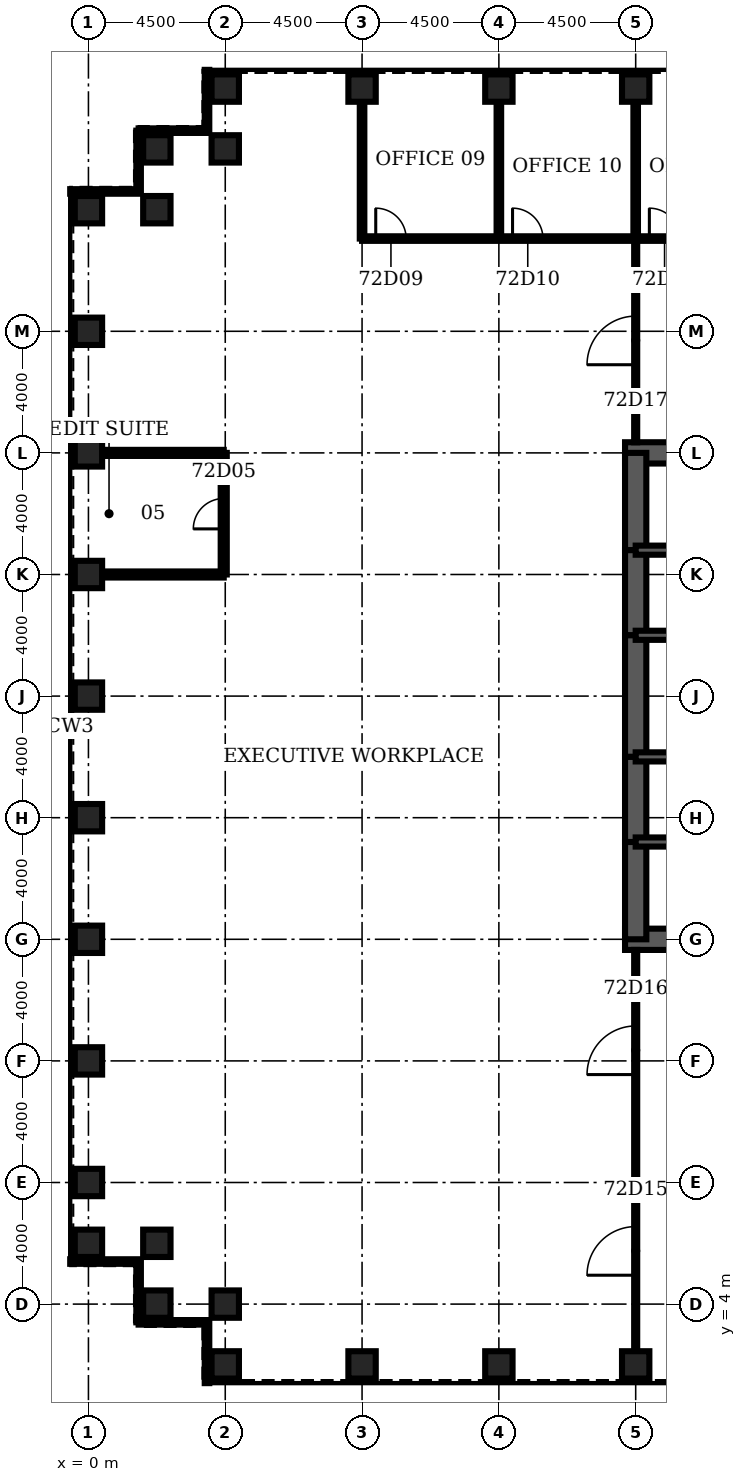
"""IFC4 building model, lengths in metres.
Left out: names, types, materials, properties, quantities, classifications, styles, units other than length and angle.
Written with IfcOpenShell. Run it as: python <this file> out.ifc"""

import sys

from ifc_helpers import new_model, si_unit, direction, frame, frame_2d, origin, origin_2d, place, context, subcontext, project, spatial, rectangle, hollow_rectangle, extrude, element, fill, save


model = new_model("IFC4")
c1 = context("Model", 3, precision=1e-05, world=origin(), true_north=direction((0.0, 1.0)))
c2 = subcontext(c1, "Body", "Model", "MODEL_VIEW")
j1 = project(units=[si_unit("LENGTHUNIT", "METRE"), si_unit("PLANEANGLEUNIT", "RADIAN")], contexts=[c1])
p1 = place(None, origin())
s1 = spatial("IfcSite", under=j1, at=p1, CompositionType="ELEMENT")
p2 = place(p1, origin())
s2 = spatial("IfcBuilding", under=s1, at=p2, CompositionType="ELEMENT")
p3 = place(p2, frame((0.0, 0.0, 317.3)))
s3 = spatial("IfcBuildingStorey", under=s2, at=p3, CompositionType="ELEMENT", Elevation=317.3)
for number, where, z_axis, x_axis in (
    (1, (4.5, 2.0, 0.0), (0.0, 0.0, 1.0), (0.0, 1.0, 0.0)),
    (2, (9.0, 2.0, 0.0), (0.0, 0.0, 1.0), (0.0, 1.0, 0.0)),
    (3, (13.5, 2.0, 0.0), (0.0, 0.0, 1.0), (0.0, 1.0, 0.0)),
    (4, (18.0, 2.0, 0.0), (0.0, 0.0, 1.0), (0.0, 1.0, 0.0)),
    (5, (18.0, 44.0, 0.0), (0.0, 0.0, 1.0), (0.0, 1.0, 0.0)),
    (6, (13.5, 44.0, 0.0), (0.0, 0.0, 1.0), (0.0, 1.0, 0.0)),
    (7, (9.0, 44.0, 0.0), (0.0, 0.0, 1.0), (0.0, 1.0, 0.0)),
    (8, (4.5, 44.0, 0.0), (0.0, 0.0, 1.0), (0.0, 1.0, 0.0)),
    (9, (4.5, 42.0, 0.0), (0.0, 0.0, 1.0), (0.0, 1.0, 0.0)),
    (10, (2.25, 42.0, 0.0), (0.0, 0.0, 1.0), (1.0, 0.0, 0.0)),
    (11, (2.25, 40.0, 0.0), (0.0, 0.0, 1.0), (1.0, 0.0, 0.0)),
    (12, (0.0, 40.0, 0.0), (0.0, 0.0, 1.0), (1.0, 0.0, 0.0)),
    (13, (0.0, 36.0, 0.0), (0.0, 0.0, 1.0), (1.0, 0.0, 0.0)),
    (14, (0.0, 32.0, 0.0), (0.0, 0.0, 1.0), (1.0, 0.0, 0.0)),
    (15, (0.0, 28.0, 0.0), (0.0, 0.0, 1.0), (1.0, 0.0, 0.0)),
    (16, (0.0, 24.0, 0.0), (0.0, 0.0, 1.0), (1.0, 0.0, 0.0)),
    (17, (0.0, 20.0, 0.0), (0.0, 0.0, 1.0), (1.0, 0.0, 0.0)),
    (18, (0.0, 16.0, 0.0), (0.0, 0.0, 1.0), (1.0, 0.0, 0.0)),
    (19, (0.0, 12.0, 0.0), (0.0, 0.0, 1.0), (1.0, 0.0, 0.0)),
    (20, (0.0, 8.0, 0.0), (0.0, 0.0, 1.0), (1.0, 0.0, 0.0)),
    (21, (0.0, 6.0, 0.0), (0.0, 0.0, 1.0), (1.0, 0.0, 0.0)),
    (22, (2.25, 6.0, 0.0), (0.0, 0.0, 1.0), (1.0, 0.0, 0.0)),
    (23, (2.25, 4.0, 0.0), (0.0, 0.0, 1.0), (1.0, 0.0, 0.0)),
    (24, (4.5, 4.0, 0.0), (0.0, 0.0, 1.0), (0.0, 1.0, 0.0)),
):
    element("IfcColumn", number, at=place(p3, frame(where, z_axis=z_axis, x_axis=x_axis)), inside=s3, PredefinedType="COLUMN", context=c2, shape_type="SweptSolid", body=[
        extrude(hollow_rectangle(XDim=0.9, YDim=0.9, WallThickness=0.05, at=origin_2d()), origin(), (0.0, 0.0, 1.0), 4.2),
    ])
for number, where, z_axis, x_axis in (
    (25, (17.65, 16.0, 0.0), (0.0, 0.0, 1.0), (1.0, 0.0, 0.0)),
    (26, (27.0, 32.0, 0.0), (0.0, 0.0, 1.0), (-1.0, 0.0, 0.0)),
):
    element("IfcWall", number, at=place(p3, frame(where, z_axis=z_axis, x_axis=x_axis)), inside=s3, PredefinedType="SHEAR", context=c2, shape_type="SweptSolid", body=[
        extrude(rectangle(XDim=9.35, YDim=0.7, at=frame_2d((4.675, 0.0))), origin(), (0.0, 0.0, 1.0), 4.2),
    ])
p4 = place(p3, frame((18.0, 32.0, 0.0), z_axis=(0.0, 0.0, 1.0), x_axis=(0.0, -1.0, 0.0)))
e27 = element("IfcWall", 27, at=p4, inside=s3, PredefinedType="SHEAR", context=c2, shape_type="SweptSolid", body=[
    extrude(rectangle(XDim=3.2, YDim=0.7, at=frame_2d((1.6, 0.0))), origin(), (0.0, 0.0, 1.0), 4.2),
])
p5 = place(p3, frame((18.0, 28.8, 0.0), z_axis=(0.0, 0.0, 1.0), x_axis=(0.0, -1.0, 0.0)))
e28 = element("IfcWall", 28, at=p5, inside=s3, PredefinedType="SHEAR", context=c2, shape_type="SweptSolid", body=[
    extrude(rectangle(XDim=2.8, YDim=0.7, at=frame_2d((1.4, 0.0))), origin(), (0.0, 0.0, 1.0), 4.2),
])
p6 = place(p5, frame((0.4, 0.0, 0.0)))
e29 = element("IfcOpeningElement", 29, at=p6, cuts=e28, PredefinedType="OPENING", context=c2, shape_type="SweptSolid", body=[
    extrude(rectangle(XDim=1.8, YDim=2.1, at=frame_2d((0.9, 1.05))), frame((0.0, 0.36, 0.0), z_axis=(0.0, -1.0, 0.0), x_axis=(1.0, 0.0, 0.0)), (0.0, 0.0, 1.0), 0.72),
])
p7 = place(p3, frame((18.0, 26.0, 0.0), z_axis=(0.0, 0.0, 1.0), x_axis=(0.0, -1.0, 0.0)))
e30 = element("IfcWall", 30, at=p7, inside=s3, PredefinedType="SHEAR", context=c2, shape_type="SweptSolid", body=[
    extrude(rectangle(XDim=4.0, YDim=0.7, at=frame_2d((2.0, 0.0))), origin(), (0.0, 0.0, 1.0), 4.2),
])
p8 = place(p3, frame((18.0, 22.0, 0.0), z_axis=(0.0, 0.0, 1.0), x_axis=(0.0, -1.0, 0.0)))
e31 = element("IfcWall", 31, at=p8, inside=s3, PredefinedType="SHEAR", context=c2, shape_type="SweptSolid", body=[
    extrude(rectangle(XDim=2.8, YDim=0.7, at=frame_2d((1.4, 0.0))), origin(), (0.0, 0.0, 1.0), 4.2),
])
p9 = place(p8, frame((0.6, 0.0, 0.0)))
e32 = element("IfcOpeningElement", 32, at=p9, cuts=e31, PredefinedType="OPENING", context=c2, shape_type="SweptSolid", body=[
    extrude(rectangle(XDim=1.8, YDim=2.1, at=frame_2d((0.9, 1.05))), frame((0.0, 0.36, 0.0), z_axis=(0.0, -1.0, 0.0), x_axis=(1.0, 0.0, 0.0)), (0.0, 0.0, 1.0), 0.72),
])
p10 = place(p3, frame((18.0, 19.2, 0.0), z_axis=(0.0, 0.0, 1.0), x_axis=(0.0, -1.0, 0.0)))
e33 = element("IfcWall", 33, at=p10, inside=s3, PredefinedType="SHEAR", context=c2, shape_type="SweptSolid", body=[
    extrude(rectangle(XDim=3.2, YDim=0.7, at=frame_2d((1.6, 0.0))), origin(), (0.0, 0.0, 1.0), 4.2),
])
p11 = place(p3, frame((18.0, 19.2, 0.0), z_axis=(0.0, 0.0, 1.0), x_axis=(1.0, 0.0, 0.0)))
e34 = element("IfcWall", 34, at=p11, inside=s3, PredefinedType="SOLIDWALL", context=c2, shape_type="SweptSolid", body=[
    extrude(rectangle(XDim=9.0, YDim=0.3, at=frame_2d((4.5, 0.0))), origin(), (0.0, 0.0, 1.0), 4.2),
])
p12 = place(p11, frame((0.65, 0.0, 0.0)))
e35 = element("IfcOpeningElement", 35, at=p12, cuts=e34, PredefinedType="OPENING", context=c2, shape_type="SweptSolid", body=[
    extrude(rectangle(XDim=1.0, YDim=2.1, at=frame_2d((0.5, 1.05))), frame((0.0, 0.16, 0.0), z_axis=(0.0, -1.0, 0.0), x_axis=(1.0, 0.0, 0.0)), (0.0, 0.0, 1.0), 0.32),
])
p13 = place(p3, frame((18.0, 28.8, 0.0), z_axis=(0.0, 0.0, 1.0), x_axis=(1.0, 0.0, 0.0)))
e36 = element("IfcWall", 36, at=p13, inside=s3, PredefinedType="SOLIDWALL", context=c2, shape_type="SweptSolid", body=[
    extrude(rectangle(XDim=9.0, YDim=0.3, at=frame_2d((4.5, 0.0))), origin(), (0.0, 0.0, 1.0), 4.2),
])
p14 = place(p13, frame((0.65, 0.0, 0.0)))
e37 = element("IfcOpeningElement", 37, at=p14, cuts=e36, PredefinedType="OPENING", context=c2, shape_type="SweptSolid", body=[
    extrude(rectangle(XDim=1.0, YDim=2.1, at=frame_2d((0.5, 1.05))), frame((0.0, 0.16, 0.0), z_axis=(0.0, -1.0, 0.0), x_axis=(1.0, 0.0, 0.0)), (0.0, 0.0, 1.0), 0.32),
])
p15 = place(p3, frame((18.0, 22.0, 0.0), z_axis=(0.0, 0.0, 1.0), x_axis=(1.0, 0.0, 0.0)))
e38 = element("IfcWall", 38, at=p15, inside=s3, PredefinedType="SOLIDWALL", context=c2, shape_type="SweptSolid", body=[
    extrude(rectangle(XDim=6.0, YDim=0.3, at=frame_2d((3.0, 0.0))), origin(), (0.0, 0.0, 1.0), 4.2),
])
p16 = place(p15, frame((4.4, 0.0, 0.0)))
e39 = element("IfcOpeningElement", 39, at=p16, cuts=e38, PredefinedType="OPENING", context=c2, shape_type="SweptSolid", body=[
    extrude(rectangle(XDim=1.0, YDim=2.1, at=frame_2d((0.5, 1.05))), frame((0.0, 0.16, 0.0), z_axis=(0.0, -1.0, 0.0), x_axis=(1.0, 0.0, 0.0)), (0.0, 0.0, 1.0), 0.32),
])
p17 = place(p15, frame((0.9, 0.0, 0.0)))
e40 = element("IfcOpeningElement", 40, at=p17, cuts=e38, PredefinedType="OPENING", context=c2, shape_type="SweptSolid", body=[
    extrude(rectangle(XDim=1.0, YDim=2.1, at=frame_2d((0.5, 1.05))), frame((0.0, 0.16, 0.0), z_axis=(0.0, -1.0, 0.0), x_axis=(1.0, 0.0, 0.0)), (0.0, 0.0, 1.0), 0.32),
])
p18 = place(p3, frame((18.0, 26.0, 0.0), z_axis=(0.0, 0.0, 1.0), x_axis=(1.0, 0.0, 0.0)))
e41 = element("IfcWall", 41, at=p18, inside=s3, PredefinedType="SOLIDWALL", context=c2, shape_type="SweptSolid", body=[
    extrude(rectangle(XDim=6.0, YDim=0.3, at=frame_2d((3.0, 0.0))), origin(), (0.0, 0.0, 1.0), 4.2),
])
for number, where, z_axis, x_axis in (
    (42, (0.45, 28.0, 0.0), (0.0, 0.0, 1.0), (1.0, 0.0, 0.0)),
    (43, (0.45, 32.0, 0.0), (0.0, 0.0, 1.0), (1.0, 0.0, 0.0)),
):
    element("IfcWall", number, at=place(p3, frame(where, z_axis=z_axis, x_axis=x_axis)), inside=s3, PredefinedType="PARTITIONING", context=c2, shape_type="SweptSolid", body=[
        extrude(rectangle(XDim=4.0, YDim=0.2, at=frame_2d((2.0, 0.0))), origin(), (0.0, 0.0, 1.0), 3.0),
    ])
p19 = place(p3, frame((9.0, 39.05, 0.0), z_axis=(0.0, 0.0, 1.0), x_axis=(1.0, 0.0, 0.0)))
e44 = element("IfcWall", 44, at=p19, inside=s3, PredefinedType="PARTITIONING", context=c2, shape_type="SweptSolid", body=[
    extrude(rectangle(XDim=27.0, YDim=0.15, at=frame_2d((13.5, 0.0))), origin(), (0.0, 0.0, 1.0), 3.0),
])
p20 = place(p19, frame((0.45, 0.0, 0.0)))
e45 = element("IfcOpeningElement", 45, at=p20, cuts=e44, PredefinedType="OPENING", context=c2, shape_type="SweptSolid", body=[
    extrude(rectangle(XDim=1.0, YDim=2.1, at=frame_2d((0.5, 1.05))), frame((0.0, 0.085, 0.0), z_axis=(0.0, -1.0, 0.0), x_axis=(1.0, 0.0, 0.0)), (0.0, 0.0, 1.0), 0.17),
])
p21 = place(p19, frame((4.95, 0.0, 0.0)))
e46 = element("IfcOpeningElement", 46, at=p21, cuts=e44, PredefinedType="OPENING", context=c2, shape_type="SweptSolid", body=[
    extrude(rectangle(XDim=1.0, YDim=2.1, at=frame_2d((0.5, 1.05))), frame((0.0, 0.085, 0.0), z_axis=(0.0, -1.0, 0.0), x_axis=(1.0, 0.0, 0.0)), (0.0, 0.0, 1.0), 0.17),
])
p22 = place(p19, frame((9.45, 0.0, 0.0)))
e47 = element("IfcOpeningElement", 47, at=p22, cuts=e44, PredefinedType="OPENING", context=c2, shape_type="SweptSolid", body=[
    extrude(rectangle(XDim=1.0, YDim=2.1, at=frame_2d((0.5, 1.05))), frame((0.0, 0.085, 0.0), z_axis=(0.0, -1.0, 0.0), x_axis=(1.0, 0.0, 0.0)), (0.0, 0.0, 1.0), 0.17),
])
p23 = place(p19, frame((13.95, 0.0, 0.0)))
e48 = element("IfcOpeningElement", 48, at=p23, cuts=e44, PredefinedType="OPENING", context=c2, shape_type="SweptSolid", body=[
    extrude(rectangle(XDim=1.0, YDim=2.1, at=frame_2d((0.5, 1.05))), frame((0.0, 0.085, 0.0), z_axis=(0.0, -1.0, 0.0), x_axis=(1.0, 0.0, 0.0)), (0.0, 0.0, 1.0), 0.17),
])
p24 = place(p19, frame((18.45, 0.0, 0.0)))
e49 = element("IfcOpeningElement", 49, at=p24, cuts=e44, PredefinedType="OPENING", context=c2, shape_type="SweptSolid", body=[
    extrude(rectangle(XDim=1.0, YDim=2.1, at=frame_2d((0.5, 1.05))), frame((0.0, 0.085, 0.0), z_axis=(0.0, -1.0, 0.0), x_axis=(1.0, 0.0, 0.0)), (0.0, 0.0, 1.0), 0.17),
])
p25 = place(p19, frame((22.95, 0.0, 0.0)))
e50 = element("IfcOpeningElement", 50, at=p25, cuts=e44, PredefinedType="OPENING", context=c2, shape_type="SweptSolid", body=[
    extrude(rectangle(XDim=1.0, YDim=2.1, at=frame_2d((0.5, 1.05))), frame((0.0, 0.085, 0.0), z_axis=(0.0, -1.0, 0.0), x_axis=(1.0, 0.0, 0.0)), (0.0, 0.0, 1.0), 0.17),
])
p26 = place(p3, frame((4.45, 28.0, 0.0), z_axis=(0.0, 0.0, 1.0), x_axis=(0.0, 1.0, 0.0)))
e51 = element("IfcWall", 51, at=p26, inside=s3, PredefinedType="PARTITIONING", context=c2, shape_type="SweptSolid", body=[
    extrude(rectangle(XDim=4.0, YDim=0.2, at=frame_2d((2.0, 0.0))), origin(), (0.0, 0.0, 1.0), 3.0),
])
p27 = place(p26, frame((1.5, 0.0, 0.0)))
e52 = element("IfcOpeningElement", 52, at=p27, cuts=e51, PredefinedType="OPENING", context=c2, shape_type="SweptSolid", body=[
    extrude(rectangle(XDim=1.0, YDim=2.1, at=frame_2d((0.5, 1.05))), frame((0.0, 0.11, 0.0), z_axis=(0.0, -1.0, 0.0), x_axis=(1.0, 0.0, 0.0)), (0.0, 0.0, 1.0), 0.22),
])
for number, where, z_axis, x_axis in (
    (53, (9.0, 39.05, 0.0), (0.0, 0.0, 1.0), (0.0, 1.0, 0.0)),
    (54, (13.5, 39.05, 0.0), (0.0, 0.0, 1.0), (0.0, 1.0, 0.0)),
):
    element("IfcWall", number, at=place(p3, frame(where, z_axis=z_axis, x_axis=x_axis)), inside=s3, PredefinedType="PARTITIONING", context=c2, shape_type="SweptSolid", body=[
        extrude(rectangle(XDim=4.5, YDim=0.15, at=frame_2d((2.25, 0.0))), origin(), (0.0, 0.0, 1.0), 3.0),
    ])
p28 = place(p3, frame((18.0, 2.45, 0.0), z_axis=(0.0, 0.0, 1.0), x_axis=(0.0, 1.0, 0.0)))
e55 = element("IfcWall", 55, at=p28, inside=s3, PredefinedType="PARTITIONING", context=c2, shape_type="SweptSolid", body=[
    extrude(rectangle(XDim=13.2, YDim=0.1, at=frame_2d((6.6, 0.0))), origin(), (0.0, 0.0, 1.0), 3.0),
])
p29 = place(p28, frame((2.5, 0.0, 0.0)))
e56 = element("IfcOpeningElement", 56, at=p29, cuts=e55, PredefinedType="OPENING", context=c2, shape_type="SweptSolid", body=[
    extrude(rectangle(XDim=1.6, YDim=2.1, at=frame_2d((0.8, 1.05))), frame((0.0, 0.06, 0.0), z_axis=(0.0, -1.0, 0.0), x_axis=(1.0, 0.0, 0.0)), (0.0, 0.0, 1.0), 0.12),
])
p30 = place(p28, frame((9.1, 0.0, 0.0)))
e57 = element("IfcOpeningElement", 57, at=p30, cuts=e55, PredefinedType="OPENING", context=c2, shape_type="SweptSolid", body=[
    extrude(rectangle(XDim=1.6, YDim=2.1, at=frame_2d((0.8, 1.05))), frame((0.0, 0.06, 0.0), z_axis=(0.0, -1.0, 0.0), x_axis=(1.0, 0.0, 0.0)), (0.0, 0.0, 1.0), 0.12),
])
p31 = place(p3, frame((18.0, 32.35, 0.0), z_axis=(0.0, 0.0, 1.0), x_axis=(0.0, 1.0, 0.0)))
e58 = element("IfcWall", 58, at=p31, inside=s3, PredefinedType="PARTITIONING", context=c2, shape_type="SweptSolid", body=[
    extrude(rectangle(XDim=6.7, YDim=0.1, at=frame_2d((3.35, 0.0))), origin(), (0.0, 0.0, 1.0), 3.0),
])
p32 = place(p31, frame((2.55, 0.0, 0.0)))
e59 = element("IfcOpeningElement", 59, at=p32, cuts=e58, PredefinedType="OPENING", context=c2, shape_type="SweptSolid", body=[
    extrude(rectangle(XDim=1.6, YDim=2.1, at=frame_2d((0.8, 1.05))), frame((0.0, 0.06, 0.0), z_axis=(0.0, -1.0, 0.0), x_axis=(1.0, 0.0, 0.0)), (0.0, 0.0, 1.0), 0.12),
])
p33 = place(p3, frame((18.0, 39.05, 0.0), z_axis=(0.0, 0.0, 1.0), x_axis=(0.0, 1.0, 0.0)))
e60 = element("IfcWall", 60, at=p33, inside=s3, PredefinedType="PARTITIONING", context=c2, shape_type="SweptSolid", body=[
    extrude(rectangle(XDim=4.5, YDim=0.15, at=frame_2d((2.25, 0.0))), origin(), (0.0, 0.0, 1.0), 3.0),
])
p34 = place(p3, frame((3.9, 44.6, 0.0), z_axis=(0.0, 0.0, 1.0), x_axis=(0.0, -1.0, 0.0)))
e61 = element("IfcWall", 61, at=p34, inside=s3, PredefinedType="ELEMENTEDWALL", context=c2, shape_type="SweptSolid", body=[
    extrude(rectangle(XDim=2.0, YDim=0.15, at=frame_2d((1.0, 0.0))), origin(), (0.0, 0.0, 1.0), 4.04),
])
p35 = place(p3, frame((3.9, 42.6, 0.0), z_axis=(0.0, 0.0, 1.0), x_axis=(-1.0, 0.0, 0.0)))
e62 = element("IfcWall", 62, at=p35, inside=s3, PredefinedType="ELEMENTEDWALL", context=c2, shape_type="SweptSolid", body=[
    extrude(rectangle(XDim=2.25, YDim=0.15, at=frame_2d((1.125, 0.0))), origin(), (0.0, 0.0, 1.0), 4.04),
])
p36 = place(p3, frame((1.65, 42.6, 0.0), z_axis=(0.0, 0.0, 1.0), x_axis=(0.0, -1.0, 0.0)))
e63 = element("IfcWall", 63, at=p36, inside=s3, PredefinedType="ELEMENTEDWALL", context=c2, shape_type="SweptSolid", body=[
    extrude(rectangle(XDim=2.0, YDim=0.15, at=frame_2d((1.0, 0.0))), origin(), (0.0, 0.0, 1.0), 4.04),
])
for number, where, z_axis, x_axis in (
    (64, (1.65, 40.6, 0.0), (0.0, 0.0, 1.0), (-1.0, 0.0, 0.0)),
    (65, (-0.6, 5.4, 0.0), (0.0, 0.0, 1.0), (1.0, 0.0, 0.0)),
):
    element("IfcWall", number, at=place(p3, frame(where, z_axis=z_axis, x_axis=x_axis)), inside=s3, PredefinedType="ELEMENTEDWALL", context=c2, shape_type="SweptSolid", body=[
        extrude(rectangle(XDim=2.25, YDim=0.15, at=frame_2d((1.125, 0.0))), origin(), (0.0, 0.0, 1.0), 4.04),
    ])
p37 = place(p3, frame((1.65, 5.4, 0.0), z_axis=(0.0, 0.0, 1.0), x_axis=(0.0, -1.0, 0.0)))
e66 = element("IfcWall", 66, at=p37, inside=s3, PredefinedType="ELEMENTEDWALL", context=c2, shape_type="SweptSolid", body=[
    extrude(rectangle(XDim=2.0, YDim=0.15, at=frame_2d((1.0, 0.0))), origin(), (0.0, 0.0, 1.0), 4.04),
])
p38 = place(p3, frame((1.65, 3.4, 0.0), z_axis=(0.0, 0.0, 1.0), x_axis=(1.0, 0.0, 0.0)))
e67 = element("IfcWall", 67, at=p38, inside=s3, PredefinedType="ELEMENTEDWALL", context=c2, shape_type="SweptSolid", body=[
    extrude(rectangle(XDim=2.25, YDim=0.15, at=frame_2d((1.125, 0.0))), origin(), (0.0, 0.0, 1.0), 4.04),
])
p39 = place(p3, frame((3.9, 3.4, 0.0), z_axis=(0.0, 0.0, 1.0), x_axis=(0.0, -1.0, 0.0)))
e68 = element("IfcWall", 68, at=p39, inside=s3, PredefinedType="ELEMENTEDWALL", context=c2, shape_type="SweptSolid", body=[
    extrude(rectangle(XDim=2.0, YDim=0.15, at=frame_2d((1.0, 0.0))), origin(), (0.0, 0.0, 1.0), 4.04),
])
p40 = place(p27, origin())
e69 = element("IfcDoor", 69, at=p40, inside=s3, OperationType="SINGLE_SWING_LEFT", PredefinedType="DOOR", context=c2, shape_type="SweptSolid", body=[
    extrude(rectangle(XDim=1.0, YDim=2.1, at=frame_2d((0.5, 1.05))), frame((0.0, 0.025, 0.0), z_axis=(0.0, -1.0, 0.0), x_axis=(1.0, 0.0, 0.0)), (0.0, 0.0, 1.0), 0.05),
])
fill(e52, e69)
p41 = place(p20, origin())
e70 = element("IfcDoor", 70, at=p41, inside=s3, OperationType="SINGLE_SWING_LEFT", PredefinedType="DOOR", context=c2, shape_type="SweptSolid", body=[
    extrude(rectangle(XDim=1.0, YDim=2.1, at=frame_2d((0.5, 1.05))), frame((0.0, 0.025, 0.0), z_axis=(0.0, -1.0, 0.0), x_axis=(1.0, 0.0, 0.0)), (0.0, 0.0, 1.0), 0.05),
])
fill(e45, e70)
p42 = place(p21, origin())
e71 = element("IfcDoor", 71, at=p42, inside=s3, OperationType="SINGLE_SWING_LEFT", PredefinedType="DOOR", context=c2, shape_type="SweptSolid", body=[
    extrude(rectangle(XDim=1.0, YDim=2.1, at=frame_2d((0.5, 1.05))), frame((0.0, 0.025, 0.0), z_axis=(0.0, -1.0, 0.0), x_axis=(1.0, 0.0, 0.0)), (0.0, 0.0, 1.0), 0.05),
])
fill(e46, e71)
p43 = place(p22, origin())
e72 = element("IfcDoor", 72, at=p43, inside=s3, OperationType="SINGLE_SWING_LEFT", PredefinedType="DOOR", context=c2, shape_type="SweptSolid", body=[
    extrude(rectangle(XDim=1.0, YDim=2.1, at=frame_2d((0.5, 1.05))), frame((0.0, 0.025, 0.0), z_axis=(0.0, -1.0, 0.0), x_axis=(1.0, 0.0, 0.0)), (0.0, 0.0, 1.0), 0.05),
])
fill(e47, e72)
p44 = place(p29, origin())
e73 = element("IfcDoor", 73, at=p44, inside=s3, OperationType="SINGLE_SWING_LEFT", PredefinedType="DOOR", context=c2, shape_type="SweptSolid", body=[
    extrude(rectangle(XDim=1.6, YDim=2.1, at=frame_2d((0.8, 1.05))), frame((0.0, 0.025, 0.0), z_axis=(0.0, -1.0, 0.0), x_axis=(1.0, 0.0, 0.0)), (0.0, 0.0, 1.0), 0.05),
])
fill(e56, e73)
p45 = place(p30, origin())
e74 = element("IfcDoor", 74, at=p45, inside=s3, OperationType="SINGLE_SWING_LEFT", PredefinedType="DOOR", context=c2, shape_type="SweptSolid", body=[
    extrude(rectangle(XDim=1.6, YDim=2.1, at=frame_2d((0.8, 1.05))), frame((0.0, 0.025, 0.0), z_axis=(0.0, -1.0, 0.0), x_axis=(1.0, 0.0, 0.0)), (0.0, 0.0, 1.0), 0.05),
])
fill(e57, e74)
p46 = place(p32, origin())
e75 = element("IfcDoor", 75, at=p46, inside=s3, OperationType="SINGLE_SWING_LEFT", PredefinedType="DOOR", context=c2, shape_type="SweptSolid", body=[
    extrude(rectangle(XDim=1.6, YDim=2.1, at=frame_2d((0.8, 1.05))), frame((0.0, 0.025, 0.0), z_axis=(0.0, -1.0, 0.0), x_axis=(1.0, 0.0, 0.0)), (0.0, 0.0, 1.0), 0.05),
])
fill(e59, e75)
p47 = place(p12, origin())
e76 = element("IfcDoor", 76, at=p47, inside=s3, OperationType="SINGLE_SWING_LEFT", PredefinedType="DOOR", context=c2, shape_type="SweptSolid", body=[
    extrude(rectangle(XDim=1.0, YDim=2.1, at=frame_2d((0.5, 1.05))), frame((0.0, 0.025, 0.0), z_axis=(0.0, -1.0, 0.0), x_axis=(1.0, 0.0, 0.0)), (0.0, 0.0, 1.0), 0.05),
])
fill(e35, e76)
p48 = place(p14, origin())
e77 = element("IfcDoor", 77, at=p48, inside=s3, OperationType="SINGLE_SWING_LEFT", PredefinedType="DOOR", context=c2, shape_type="SweptSolid", body=[
    extrude(rectangle(XDim=1.0, YDim=2.1, at=frame_2d((0.5, 1.05))), frame((0.0, 0.025, 0.0), z_axis=(0.0, -1.0, 0.0), x_axis=(1.0, 0.0, 0.0)), (0.0, 0.0, 1.0), 0.05),
])
fill(e37, e77)
p49 = place(p9, origin())
e78 = element("IfcDoor", 78, at=p49, inside=s3, OperationType="SINGLE_SWING_LEFT", PredefinedType="DOOR", context=c2, shape_type="SweptSolid", body=[
    extrude(rectangle(XDim=1.8, YDim=2.1, at=frame_2d((0.9, 1.05))), frame((0.0, 0.35, 0.0), z_axis=(0.0, -1.0, 0.0), x_axis=(1.0, 0.0, 0.0)), (0.0, 0.0, 1.0), 0.699),
])
fill(e32, e78)
p50 = place(p6, origin())
e79 = element("IfcDoor", 79, at=p50, inside=s3, OperationType="SINGLE_SWING_LEFT", PredefinedType="DOOR", context=c2, shape_type="SweptSolid", body=[
    extrude(rectangle(XDim=1.8, YDim=2.1, at=frame_2d((0.9, 1.05))), frame((0.0, 0.35, 0.0), z_axis=(0.0, -1.0, 0.0), x_axis=(1.0, 0.0, 0.0)), (0.0, 0.0, 1.0), 0.699),
])
fill(e29, e79)
p51 = place(p17, origin())
e80 = element("IfcDoor", 80, at=p51, inside=s3, OperationType="SINGLE_SWING_LEFT", PredefinedType="DOOR", context=c2, shape_type="SweptSolid", body=[
    extrude(rectangle(XDim=1.0, YDim=2.1, at=frame_2d((0.5, 1.05))), frame((0.0, 0.025, 0.0), z_axis=(0.0, -1.0, 0.0), x_axis=(1.0, 0.0, 0.0)), (0.0, 0.0, 1.0), 0.05),
])
fill(e40, e80)
save(model, sys.argv[1])
